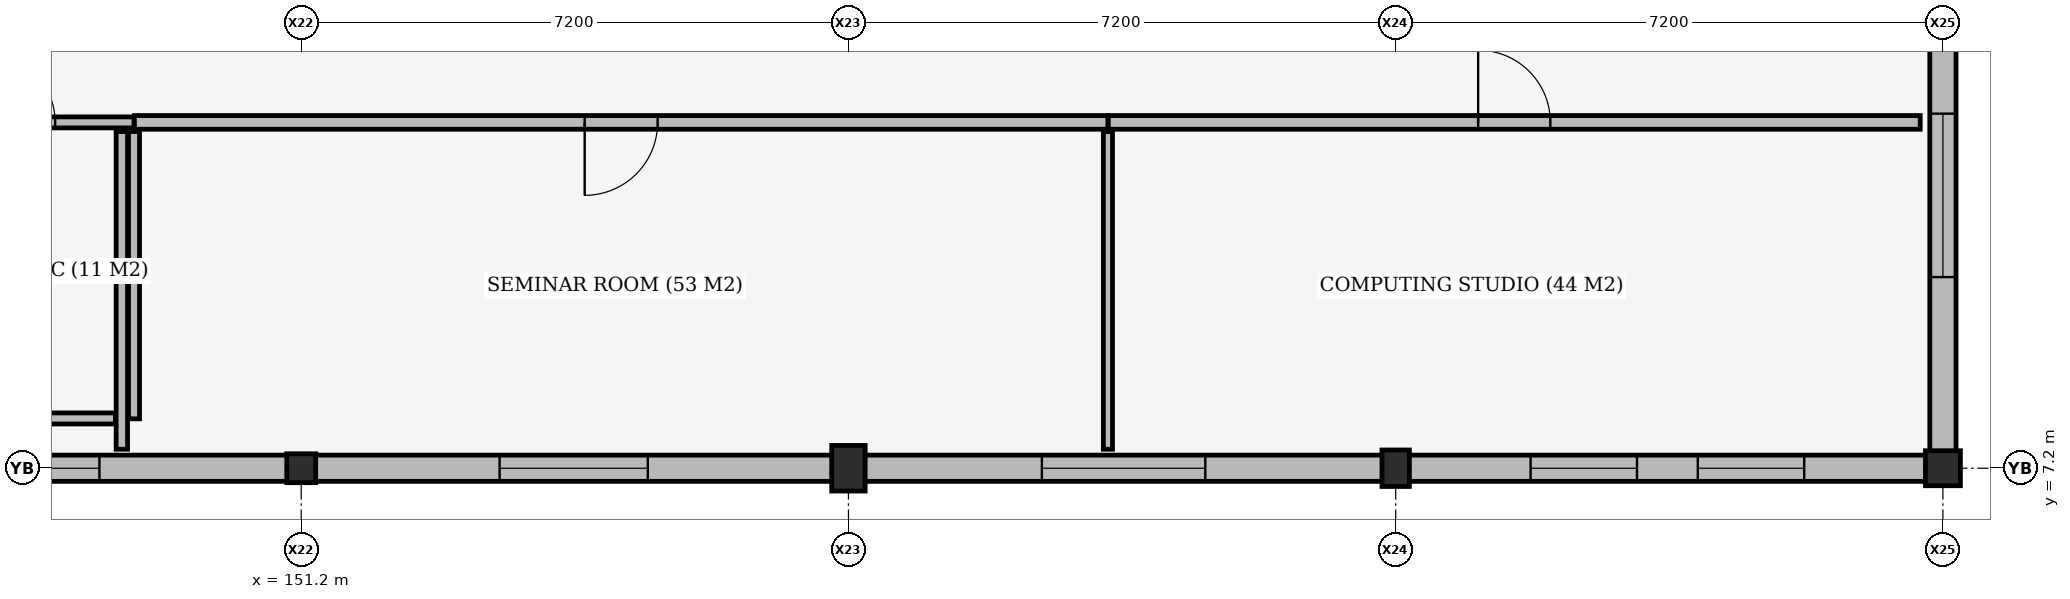
"""IFC4 building model, lengths in metres.
Left out: names, types, materials, properties, quantities, classifications, styles, units other than length and angle.
Written with IfcOpenShell. Run it as: python <this file> out.ifc"""

import sys

from ifc_helpers import new_model, si_unit, direction, frame, frame_2d, origin, origin_2d, place, context, subcontext, project, spatial, rectangle, extrude, element, fill, save


model = new_model("IFC4")
c1 = context("Model", 3, precision=1e-05, world=origin(), true_north=direction((0.0, 1.0)))
c2 = subcontext(c1, "Body", "Model", "MODEL_VIEW")
j1 = project(units=[si_unit("LENGTHUNIT", "METRE"), si_unit("PLANEANGLEUNIT", "RADIAN")], contexts=[c1])
p1 = place(None, origin())
s1 = spatial("IfcSite", under=j1, at=p1, CompositionType="ELEMENT")
p2 = place(p1, origin())
s2 = spatial("IfcBuilding", under=s1, at=p2, CompositionType="ELEMENT")
p3 = place(p2, frame((0.0, 0.0, 9.6)))
s3 = spatial("IfcBuildingStorey", under=s2, at=p3, CompositionType="ELEMENT", Elevation=9.6)
p4 = place(p3, frame((151.2, 7.2, 0.0), z_axis=(0.0, 0.0, 1.0), x_axis=(1.0, 0.0, 0.0)))
e1 = element("IfcColumn", 1, at=p4, inside=s3, PredefinedType="COLUMN", context=c2, shape_type="SweptSolid", body=[
    extrude(rectangle(XDim=0.38, YDim=0.38, at=origin_2d()), origin(), (0.0, 0.0, 1.0), 3.96),
])
p5 = place(p3, frame((158.4, 7.2, 0.0), z_axis=(0.0, 0.0, 1.0), x_axis=(1.0, 0.0, 0.0)))
e2 = element("IfcColumn", 2, at=p5, inside=s3, PredefinedType="COLUMN", context=c2, shape_type="SweptSolid", body=[
    extrude(rectangle(XDim=0.44, YDim=0.6, at=origin_2d()), origin(), (0.0, 0.0, 1.0), 3.96),
])
p6 = place(p3, frame((165.6, 7.2, 0.0), z_axis=(0.0, 0.0, 1.0), x_axis=(1.0, 0.0, 0.0)))
e3 = element("IfcColumn", 3, at=p6, inside=s3, PredefinedType="COLUMN", context=c2, shape_type="SweptSolid", body=[
    extrude(rectangle(XDim=0.36, YDim=0.48, at=origin_2d()), origin(), (0.0, 0.0, 1.0), 3.96),
])
p7 = place(p3, frame((172.8, 7.2, 0.0), z_axis=(0.0, 0.0, 1.0), x_axis=(1.0, 0.0, 0.0)))
e4 = element("IfcColumn", 4, at=p7, inside=s3, PredefinedType="COLUMN", context=c2, shape_type="SweptSolid", body=[
    extrude(rectangle(XDim=0.46, YDim=0.46, at=origin_2d()), origin(), (0.0, 0.0, 1.0), 3.96),
])
p8 = place(p3, frame((151.018, 7.2, 0.0), z_axis=(0.0, 0.0, 1.0), x_axis=(-1.0, 0.0, 0.0)))
e5 = element("IfcWall", 5, at=p8, inside=s3, PredefinedType="STANDARD", context=c2, shape_type="SweptSolid", body=[
    extrude(rectangle(XDim=6.796, YDim=0.345, at=frame_2d((3.398, 0.0))), origin(), (0.0, 0.0, 1.0), 3.92),
])
p9 = place(p8, frame((2.473, 0.0, 0.9)))
e6 = element("IfcOpeningElement", 6, at=p9, cuts=e5, PredefinedType="OPENING", context=c2, shape_type="SweptSolid", body=[
    extrude(rectangle(XDim=1.85, YDim=2.35, at=frame_2d((0.925, 1.175))), frame((0.0, 0.182, 0.0), z_axis=(0.0, -1.0, 0.0), x_axis=(1.0, 0.0, 0.0)), (0.0, 0.0, 1.0), 0.365),
])
p10 = place(p3, frame((158.188, 7.2, 0.0), z_axis=(0.0, 0.0, 1.0), x_axis=(-1.0, 0.0, 0.0)))
e7 = element("IfcWall", 7, at=p10, inside=s3, PredefinedType="STANDARD", context=c2, shape_type="SweptSolid", body=[
    extrude(rectangle(XDim=6.806, YDim=0.345, at=frame_2d((3.403, 0.0))), origin(), (0.0, 0.0, 1.0), 3.92),
])
p11 = place(p10, frame((2.428, 0.0, 0.85)))
e8 = element("IfcOpeningElement", 8, at=p11, cuts=e7, PredefinedType="OPENING", context=c2, shape_type="SweptSolid", body=[
    extrude(rectangle(XDim=1.95, YDim=2.7, at=frame_2d((0.975, 1.35))), frame((0.0, 0.182, 0.0), z_axis=(0.0, -1.0, 0.0), x_axis=(1.0, 0.0, 0.0)), (0.0, 0.0, 1.0), 0.365),
])
p12 = place(p3, frame((165.428, 7.2, 0.0), z_axis=(0.0, 0.0, 1.0), x_axis=(-1.0, 0.0, 0.0)))
e9 = element("IfcWall", 9, at=p12, inside=s3, PredefinedType="STANDARD", context=c2, shape_type="SweptSolid", body=[
    extrude(rectangle(XDim=6.816, YDim=0.345, at=frame_2d((3.408, 0.0))), origin(), (0.0, 0.0, 1.0), 3.92),
])
p13 = place(p12, frame((2.333, 0.0, 0.85)))
e10 = element("IfcOpeningElement", 10, at=p13, cuts=e9, PredefinedType="OPENING", context=c2, shape_type="SweptSolid", body=[
    extrude(rectangle(XDim=2.15, YDim=2.7, at=frame_2d((1.075, 1.35))), frame((0.0, 0.182, 0.0), z_axis=(0.0, -1.0, 0.0), x_axis=(1.0, 0.0, 0.0)), (0.0, 0.0, 1.0), 0.365),
])
p14 = place(p3, frame((172.578, 7.2, 0.0), z_axis=(0.0, 0.0, 1.0), x_axis=(-1.0, 0.0, 0.0)))
e11 = element("IfcWall", 11, at=p14, inside=s3, PredefinedType="STANDARD", context=c2, shape_type="SweptSolid", body=[
    extrude(rectangle(XDim=6.806, YDim=0.345, at=frame_2d((3.403, 0.0))), origin(), (0.0, 0.0, 1.0), 3.92),
])
p15 = place(p14, frame((1.603, 0.0, 0.8)))
e12 = element("IfcOpeningElement", 12, at=p15, cuts=e11, PredefinedType="OPENING", context=c2, shape_type="SweptSolid", body=[
    extrude(rectangle(XDim=1.4, YDim=2.6, at=frame_2d((0.7, 1.3))), frame((0.0, 0.182, 0.0), z_axis=(0.0, -1.0, 0.0), x_axis=(1.0, 0.0, 0.0)), (0.0, 0.0, 1.0), 0.365),
])
p16 = place(p14, frame((3.803, 0.0, 0.8)))
e13 = element("IfcOpeningElement", 13, at=p16, cuts=e11, PredefinedType="OPENING", context=c2, shape_type="SweptSolid", body=[
    extrude(rectangle(XDim=1.4, YDim=2.6, at=frame_2d((0.7, 1.3))), frame((0.0, 0.182, 0.0), z_axis=(0.0, -1.0, 0.0), x_axis=(1.0, 0.0, 0.0)), (0.0, 0.0, 1.0), 0.365),
])
p17 = place(p3, frame((172.8, 14.158, 0.0), z_axis=(0.0, 0.0, 1.0), x_axis=(0.0, -1.0, 0.0)))
e14 = element("IfcWall", 14, at=p17, inside=s3, PredefinedType="STANDARD", context=c2, shape_type="SweptSolid", body=[
    extrude(rectangle(XDim=6.736, YDim=0.345, at=frame_2d((3.368, 0.0))), origin(), (0.0, 0.0, 1.0), 3.92),
])
p18 = place(p17, frame((2.293, 0.0, 0.85)))
e15 = element("IfcOpeningElement", 15, at=p18, cuts=e14, PredefinedType="OPENING", context=c2, shape_type="SweptSolid", body=[
    extrude(rectangle(XDim=2.15, YDim=2.7, at=frame_2d((1.075, 1.35))), frame((0.0, 0.182, 0.0), z_axis=(0.0, -1.0, 0.0), x_axis=(1.0, 0.0, 0.0)), (0.0, 0.0, 1.0), 0.365),
])
p19 = place(p3, frame((146.005, 11.75, 0.0), z_axis=(0.0, 0.0, 1.0), x_axis=(1.0, 0.0, 0.0)))
e16 = element("IfcWall", 16, at=p19, inside=s3, PredefinedType="PLUMBINGWALL", context=c2, shape_type="SweptSolid", body=[
    extrude(rectangle(XDim=2.995, YDim=0.145, at=frame_2d((1.498, 0.0))), origin(), (0.0, 0.0, 1.0), 3.92),
])
p20 = place(p19, frame((1.038, 0.0, 0.0)))
e17 = element("IfcOpeningElement", 17, at=p20, cuts=e16, PredefinedType="OPENING", context=c2, shape_type="SweptSolid", body=[
    extrude(rectangle(XDim=0.92, YDim=2.1, at=frame_2d((0.46, 1.05))), frame((0.0, 0.083, 0.0), z_axis=(0.0, -1.0, 0.0), x_axis=(1.0, 0.0, 0.0)), (0.0, 0.0, 1.0), 0.165),
])
p21 = place(p3, frame((149.0, 7.85, 0.0), z_axis=(0.0, 0.0, 1.0), x_axis=(0.0, 1.0, 0.0)))
e18 = element("IfcWall", 18, at=p21, inside=s3, PredefinedType="PLUMBINGWALL", context=c2, shape_type="SweptSolid", body=[
    extrude(rectangle(XDim=3.78, YDim=0.145, at=frame_2d((1.89, 0.0))), origin(), (0.0, 0.0, 1.0), 3.92),
])
p22 = place(p3, frame((149.005, 11.75, 0.0), z_axis=(0.0, 0.0, 1.0), x_axis=(1.0, 0.0, 0.0)))
e19 = element("IfcWall", 19, at=p22, inside=s3, PredefinedType="PARTITIONING", context=c2, shape_type="SweptSolid", body=[
    extrude(rectangle(XDim=12.809, YDim=0.18, at=frame_2d((6.405, 0.0))), origin(), (0.0, 0.0, 1.0), 3.92),
])
p23 = place(p22, frame((5.925, 0.0, 0.0)))
e20 = element("IfcOpeningElement", 20, at=p23, cuts=e19, PredefinedType="OPENING", context=c2, shape_type="SweptSolid", body=[
    extrude(rectangle(XDim=0.96, YDim=2.15, at=frame_2d((0.48, 1.075))), frame((0.0, 0.1, 0.0), z_axis=(0.0, -1.0, 0.0), x_axis=(1.0, 0.0, 0.0)), (0.0, 0.0, 1.0), 0.2),
])
p24 = place(p3, frame((148.84, 7.45, 0.0), z_axis=(0.0, 0.0, 1.0), x_axis=(0.0, 1.0, 0.0)))
e21 = element("IfcWall", 21, at=p24, inside=s3, PredefinedType="PARTITIONING", context=c2, shape_type="SweptSolid", body=[
    extrude(rectangle(XDim=4.18, YDim=0.15, at=frame_2d((2.09, 0.0))), origin(), (0.0, 0.0, 1.0), 3.92),
])
p25 = place(p3, frame((161.814, 7.45, 0.0), z_axis=(0.0, 0.0, 1.0), x_axis=(0.0, 1.0, 0.0)))
e22 = element("IfcWall", 22, at=p25, inside=s3, PredefinedType="PARTITIONING", context=c2, shape_type="SweptSolid", body=[
    extrude(rectangle(XDim=4.18, YDim=0.12, at=frame_2d((2.09, 0.0))), origin(), (0.0, 0.0, 1.0), 3.92),
])
p26 = place(p3, frame((161.819, 11.75, 0.0), z_axis=(0.0, 0.0, 1.0), x_axis=(1.0, 0.0, 0.0)))
e23 = element("IfcWall", 23, at=p26, inside=s3, PredefinedType="PARTITIONING", context=c2, shape_type="SweptSolid", body=[
    extrude(rectangle(XDim=10.682, YDim=0.18, at=frame_2d((5.341, 0.0))), origin(), (0.0, 0.0, 1.0), 3.92),
])
p27 = place(p26, frame((4.866, 0.0, 0.0)))
e24 = element("IfcOpeningElement", 24, at=p27, cuts=e23, PredefinedType="OPENING", context=c2, shape_type="SweptSolid", body=[
    extrude(rectangle(XDim=0.95, YDim=2.15, at=frame_2d((0.475, 1.075))), frame((0.0, 0.1, 0.0), z_axis=(0.0, -1.0, 0.0), x_axis=(1.0, 0.0, 0.0)), (0.0, 0.0, 1.0), 0.2),
])
p28 = place(p3, frame((146.083, 7.855, 0.0), z_axis=(0.0, 0.0, 1.0), x_axis=(1.0, 0.0, 0.0)))
e25 = element("IfcWall", 25, at=p28, inside=s3, PredefinedType="PLUMBINGWALL", context=c2, shape_type="SweptSolid", body=[
    extrude(rectangle(XDim=2.672, YDim=0.145, at=frame_2d((1.336, 0.0))), origin(), (0.0, 0.0, 1.0), 3.92),
])
p29 = place(p9, origin())
e26 = element("IfcWindow", 26, at=p29, inside=s3, PartitioningType="DOUBLE_PANEL_VERTICAL", PredefinedType="WINDOW", context=c2, shape_type="SweptSolid", body=[
    extrude(rectangle(XDim=1.85, YDim=2.35, at=frame_2d((0.925, 1.175))), frame((0.0, 0.03, 0.0), z_axis=(0.0, -1.0, 0.0), x_axis=(1.0, 0.0, 0.0)), (0.0, 0.0, 1.0), 0.06),
])
fill(e6, e26)
p30 = place(p11, origin())
e27 = element("IfcWindow", 27, at=p30, inside=s3, PartitioningType="DOUBLE_PANEL_VERTICAL", PredefinedType="WINDOW", context=c2, shape_type="SweptSolid", body=[
    extrude(rectangle(XDim=1.95, YDim=2.7, at=frame_2d((0.975, 1.35))), frame((0.0, 0.03, 0.0), z_axis=(0.0, -1.0, 0.0), x_axis=(1.0, 0.0, 0.0)), (0.0, 0.0, 1.0), 0.06),
])
fill(e8, e27)
p31 = place(p13, origin())
e28 = element("IfcWindow", 28, at=p31, inside=s3, PartitioningType="DOUBLE_PANEL_VERTICAL", PredefinedType="WINDOW", context=c2, shape_type="SweptSolid", body=[
    extrude(rectangle(XDim=2.15, YDim=2.7, at=frame_2d((1.075, 1.35))), frame((0.0, 0.03, 0.0), z_axis=(0.0, -1.0, 0.0), x_axis=(1.0, 0.0, 0.0)), (0.0, 0.0, 1.0), 0.06),
])
fill(e10, e28)
p32 = place(p15, origin())
e29 = element("IfcWindow", 29, at=p32, inside=s3, PartitioningType="DOUBLE_PANEL_VERTICAL", PredefinedType="WINDOW", context=c2, shape_type="SweptSolid", body=[
    extrude(rectangle(XDim=1.4, YDim=2.6, at=frame_2d((0.7, 1.3))), frame((0.0, 0.03, 0.0), z_axis=(0.0, -1.0, 0.0), x_axis=(1.0, 0.0, 0.0)), (0.0, 0.0, 1.0), 0.06),
])
fill(e12, e29)
p33 = place(p16, origin())
e30 = element("IfcWindow", 30, at=p33, inside=s3, PartitioningType="DOUBLE_PANEL_VERTICAL", PredefinedType="WINDOW", context=c2, shape_type="SweptSolid", body=[
    extrude(rectangle(XDim=1.4, YDim=2.6, at=frame_2d((0.7, 1.3))), frame((0.0, 0.03, 0.0), z_axis=(0.0, -1.0, 0.0), x_axis=(1.0, 0.0, 0.0)), (0.0, 0.0, 1.0), 0.06),
])
fill(e13, e30)
p34 = place(p18, origin())
e31 = element("IfcWindow", 31, at=p34, inside=s3, PartitioningType="DOUBLE_PANEL_VERTICAL", PredefinedType="WINDOW", context=c2, shape_type="SweptSolid", body=[
    extrude(rectangle(XDim=2.15, YDim=2.7, at=frame_2d((1.075, 1.35))), frame((0.0, 0.03, 0.0), z_axis=(0.0, -1.0, 0.0), x_axis=(1.0, 0.0, 0.0)), (0.0, 0.0, 1.0), 0.06),
])
fill(e15, e31)
p35 = place(p20, origin())
e32 = element("IfcDoor", 32, at=p35, inside=s3, OperationType="SINGLE_SWING_LEFT", PredefinedType="DOOR", context=c2, shape_type="SweptSolid", body=[
    extrude(rectangle(XDim=0.92, YDim=2.1, at=frame_2d((0.46, 1.05))), frame((0.0, 0.025, 0.0), z_axis=(0.0, -1.0, 0.0), x_axis=(1.0, 0.0, 0.0)), (0.0, 0.0, 1.0), 0.05),
])
fill(e17, e32)
p36 = place(p23, origin())
e33 = element("IfcDoor", 33, at=p36, inside=s3, OperationType="SINGLE_SWING_RIGHT", PredefinedType="DOOR", context=c2, shape_type="SweptSolid", body=[
    extrude(rectangle(XDim=0.96, YDim=2.15, at=frame_2d((0.48, 1.075))), frame((0.0, 0.025, 0.0), z_axis=(0.0, -1.0, 0.0), x_axis=(1.0, 0.0, 0.0)), (0.0, 0.0, 1.0), 0.05),
])
fill(e20, e33)
p37 = place(p27, origin())
e34 = element("IfcDoor", 34, at=p37, inside=s3, OperationType="SINGLE_SWING_LEFT", PredefinedType="DOOR", context=c2, shape_type="SweptSolid", body=[
    extrude(rectangle(XDim=0.95, YDim=2.15, at=frame_2d((0.475, 1.075))), frame((0.0, 0.025, 0.0), z_axis=(0.0, -1.0, 0.0), x_axis=(1.0, 0.0, 0.0)), (0.0, 0.0, 1.0), 0.05),
])
fill(e24, e34)
save(model, sys.argv[1])
